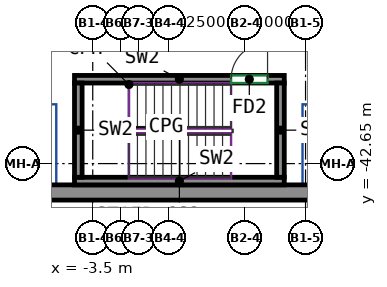
"""IFC4 building model, lengths in metres.
Left out: names, types, materials, properties, quantities, classifications, styles, units other than length and angle.
Written with IfcOpenShell. Run it as: python <this file> out.ifc"""

import sys

from ifc_helpers import new_model, si_unit, direction, frame, frame_2d, origin, place, context, subcontext, project, spatial, rectangle, extrude, source, transform, mapped, element, fill, save


model = new_model("IFC4")
c1 = context("Model", 3, precision=1e-05, world=origin(), true_north=direction((0.0, 1.0)))
c2 = subcontext(c1, "Body", "Model", "MODEL_VIEW")
j1 = project(units=[si_unit("LENGTHUNIT", "METRE"), si_unit("PLANEANGLEUNIT", "RADIAN")], contexts=[c1])
p1 = place(None, origin())
s1 = spatial("IfcSite", under=j1, at=p1, CompositionType="ELEMENT")
p2 = place(p1, origin())
s2 = spatial("IfcBuilding", under=s1, at=p2, CompositionType="ELEMENT")
p3 = place(p2, frame((0.0, 0.0, -9.0)))
s3 = spatial("IfcBuildingStorey", under=s2, at=p3, CompositionType="ELEMENT", Elevation=-9.0)
m1 = source(origin(), c2, "Body", "SweptSolid", [
    extrude(rectangle(XDim=113.0, YDim=0.5, at=frame_2d((56.5, 0.0))), origin(), (0.0, 0.0, 1.0), 4.9),
])
p4 = place(p3, frame((-57.15, -43.6, -0.4), z_axis=(0.0, 0.0, 1.0), x_axis=(1.0, 0.0, 0.0)))
e1 = element("IfcWall", 1, at=p4, inside=s3, PredefinedType="SOLIDWALL", context=c2, shape_type="MappedRepresentation", body=[
    mapped(m1, transform((0.0, 0.0, 0.0))),
])
m2 = source(origin(), c2, "Body", "SweptSolid", [
    extrude(rectangle(XDim=6.9, YDim=0.25, at=frame_2d((3.45, 0.0))), origin(), (0.0, 0.0, 1.0), 4.1),
])
p5 = place(p3, frame((-4.1, -43.225, 0.0), z_axis=(0.0, 0.0, 1.0), x_axis=(1.0, 0.0, 0.0)))
e2 = element("IfcWall", 2, at=p5, inside=s3, PredefinedType="SHEAR", context=c2, shape_type="MappedRepresentation", body=[
    mapped(m2, transform((0.0, 0.0, 0.0))),
])
p6 = place(p3, frame((-4.1, -39.875, 0.0), z_axis=(0.0, 0.0, 1.0), x_axis=(1.0, 0.0, 0.0)))
e3 = element("IfcWall", 3, at=p6, inside=s3, PredefinedType="SHEAR", context=c2, shape_type="MappedRepresentation", body=[
    mapped(m2, transform((0.0, 0.0, 0.0))),
])
p7 = place(p6, frame((5.15, 0.0, 0.0)))
e4 = element("IfcOpeningElement", 4, at=p7, cuts=e3, PredefinedType="OPENING", context=c2, shape_type="SweptSolid", body=[
    extrude(rectangle(XDim=1.2, YDim=2.1, at=frame_2d((0.6, 1.05))), frame((0.0, 0.135, 0.0), z_axis=(0.0, -1.0, 0.0), x_axis=(1.0, 0.0, 0.0)), (0.0, 0.0, 1.0), 0.27),
])
m3 = source(origin(), c2, "Body", "SweptSolid", [
    extrude(rectangle(XDim=3.1, YDim=0.25, at=frame_2d((1.55, 0.0))), origin(), (0.0, 0.0, 1.0), 4.1),
])
for number, where, z_axis, x_axis in (
    (5, (-3.975, -43.1, 0.0), (0.0, 0.0, 1.0), (0.0, 1.0, 0.0)),
    (6, (2.675, -43.1, 0.0), (0.0, 0.0, 1.0), (0.0, 1.0, 0.0)),
):
    element("IfcWall", number, at=place(p3, frame(where, z_axis=z_axis, x_axis=x_axis)), inside=s3, PredefinedType="SHEAR", context=c2, shape_type="MappedRepresentation", body=[
        mapped(m3, transform((0.0, 0.0, 0.0))),
    ])
p8 = place(p7, origin())
e7 = element("IfcDoor", 7, at=p8, inside=s3, OperationType="SINGLE_SWING_RIGHT", PredefinedType="DOOR", context=c2, shape_type="SweptSolid", body=[
    extrude(rectangle(XDim=1.2, YDim=2.1, at=frame_2d((0.6, 1.05))), frame((0.0, 0.025, 0.0), z_axis=(0.0, -1.0, 0.0), x_axis=(1.0, 0.0, 0.0)), (0.0, 0.0, 1.0), 0.05),
])
fill(e4, e7)
save(model, sys.argv[1])
